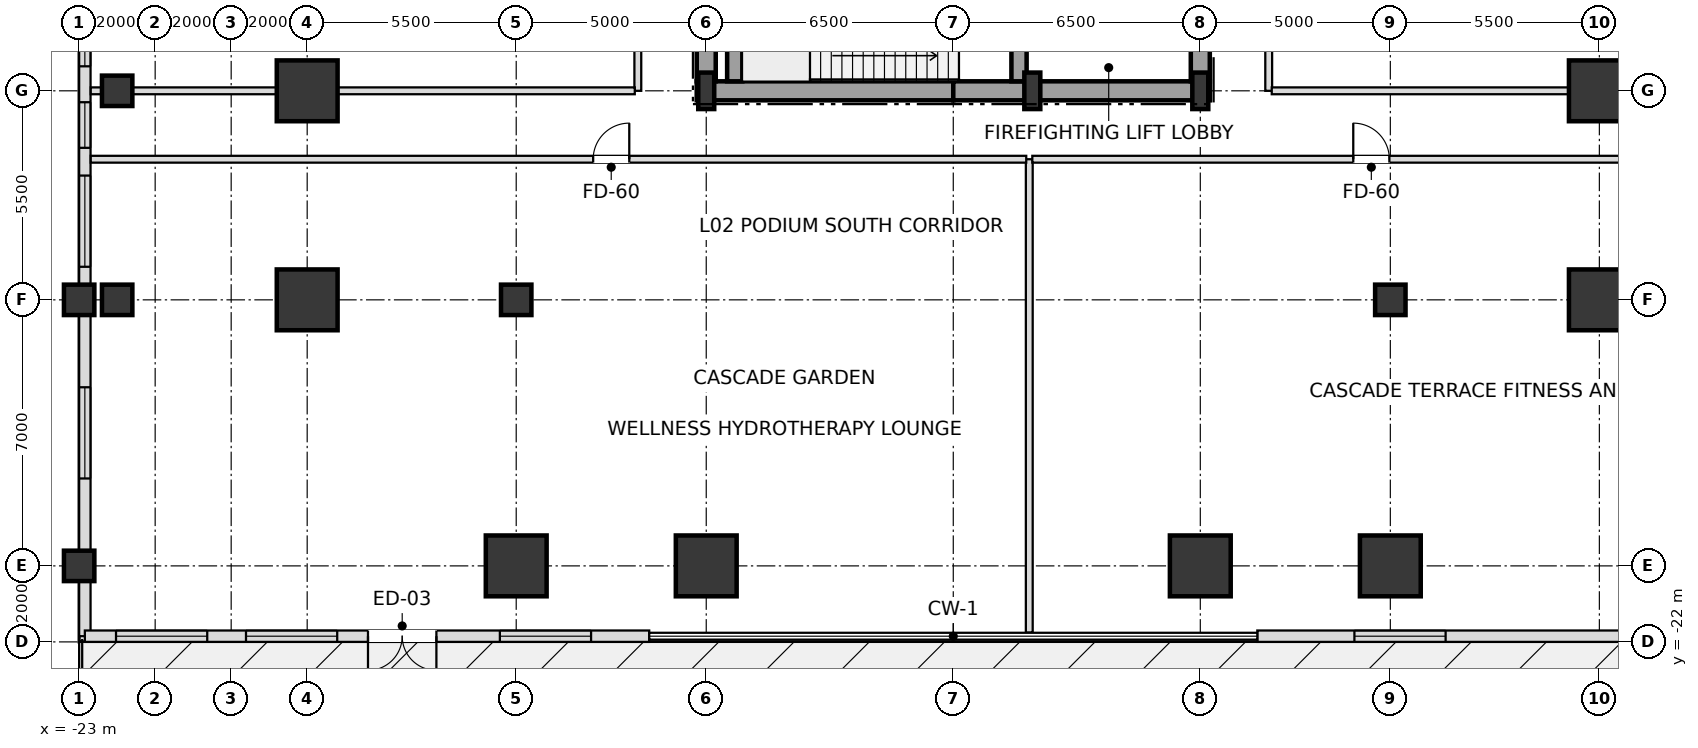
"""IFC4 building model, lengths in metres.
Left out: names, types, materials, properties, quantities, classifications, styles, units other than length and angle.
Written with IfcOpenShell. Run it as: python <this file> out.ifc"""

import sys

from ifc_helpers import new_model, si_unit, direction, frame, frame_2d, origin, origin_2d, place, context, subcontext, project, spatial, rectangle, i_section, extrude, element, fill, save


model = new_model("IFC4")
c1 = context("Model", 3, precision=1e-05, world=origin(), true_north=direction((0.0, 1.0)))
c2 = subcontext(c1, "Body", "Model", "MODEL_VIEW")
j1 = project(units=[si_unit("LENGTHUNIT", "METRE"), si_unit("PLANEANGLEUNIT", "RADIAN")], contexts=[c1])
p1 = place(None, origin())
s1 = spatial("IfcSite", under=j1, at=p1, CompositionType="ELEMENT")
p2 = place(p1, origin())
s2 = spatial("IfcBuilding", under=s1, at=p2, CompositionType="ELEMENT")
p3 = place(p2, frame((0.0, 0.0, 11.4)))
s3 = spatial("IfcBuildingStorey", under=s2, at=p3, CompositionType="ELEMENT", Elevation=11.4)
for number, where, z_axis, x_axis in (
    (1, (-6.5, -7.5, 0.0), (0.0, 0.0, 1.0), (1.0, 0.0, 0.0)),
    (2, (2.08, -7.5, 0.0), (0.0, 0.0, 1.0), (1.0, 0.0, 0.0)),
    (3, (6.5, -7.5, 0.0), (0.0, 0.0, 1.0), (1.0, 0.0, 0.0)),
):
    element("IfcColumn", number, at=place(p3, frame(where, z_axis=z_axis, x_axis=x_axis)), inside=s3, PredefinedType="COLUMN", context=c2, shape_type="SweptSolid", body=[
        extrude(i_section(OverallWidth=0.42, OverallDepth=0.96, WebThickness=0.022, FlangeThickness=0.034, at=origin_2d()), origin(), (0.0, 0.0, 1.0), 5.4),
    ])
for number, where, z_axis, x_axis in (
    (4, (-11.5, -20.0, 0.0), (0.0, 0.0, 1.0), (1.0, 0.0, 0.0)),
    (5, (-6.5, -20.0, 0.0), (0.0, 0.0, 1.0), (1.0, 0.0, 0.0)),
    (6, (6.5, -20.0, 0.0), (0.0, 0.0, 1.0), (1.0, 0.0, 0.0)),
    (7, (11.5, -20.0, 0.0), (0.0, 0.0, 1.0), (1.0, 0.0, 0.0)),
    (8, (17.0, -13.0, 0.0), (0.0, 0.0, 1.0), (1.0, 0.0, 0.0)),
    (9, (17.0, -7.5, 0.0), (0.0, 0.0, 1.0), (1.0, 0.0, 0.0)),
    (10, (-17.0, -7.5, 0.0), (0.0, 0.0, 1.0), (1.0, 0.0, 0.0)),
    (11, (-17.0, -13.0, 0.0), (0.0, 0.0, 1.0), (1.0, 0.0, 0.0)),
):
    element("IfcColumn", number, at=place(p3, frame(where, z_axis=z_axis, x_axis=x_axis)), inside=s3, PredefinedType="USERDEFINED", context=c2, shape_type="SweptSolid", body=[
        extrude(rectangle(XDim=1.6, YDim=1.6, at=origin_2d()), origin(), (0.0, 0.0, 1.0), 5.4),
    ])
for number, where, z_axis, x_axis in (
    (12, (-23.0, -20.0, 0.0), (0.0, 0.0, 1.0), (1.0, 0.0, 0.0)),
    (13, (-23.0, -13.0, 0.0), (0.0, 0.0, 1.0), (1.0, 0.0, 0.0)),
    (14, (-11.5, -13.0, 0.0), (0.0, 0.0, 1.0), (1.0, 0.0, 0.0)),
    (15, (11.5, -13.0, 0.0), (0.0, 0.0, 1.0), (1.0, 0.0, 0.0)),
    (16, (-22.0, -13.0, 0.0), (0.0, 0.0, 1.0), (1.0, 0.0, 0.0)),
    (17, (-22.0, -7.5, 0.0), (0.0, 0.0, 1.0), (1.0, 0.0, 0.0)),
):
    element("IfcColumn", number, at=place(p3, frame(where, z_axis=z_axis, x_axis=x_axis)), inside=s3, PredefinedType="COLUMN", context=c2, shape_type="SweptSolid", body=[
        extrude(rectangle(XDim=0.8, YDim=0.8, at=origin_2d()), origin(), (0.0, 0.0, 1.0), 5.4),
    ])
p4 = place(p3, frame((-22.85, 21.85, 0.0), z_axis=(0.0, 0.0, 1.0), x_axis=(0.0, -1.0, 0.0)))
e18 = element("IfcWall", 18, at=p4, inside=s3, PredefinedType="SOLIDWALL", context=c2, shape_type="SweptSolid", body=[
    extrude(rectangle(XDim=43.7, YDim=0.3, at=frame_2d((21.85, 0.0))), origin(), (0.0, 0.0, 1.0), 4.476),
])
p5 = place(p4, frame((3.02, 0.0, 0.8)))
e19 = element("IfcOpeningElement", 19, at=p5, cuts=e18, PredefinedType="OPENING", context=c2, shape_type="SweptSolid", body=[
    extrude(rectangle(XDim=2.4, YDim=2.2, at=frame_2d((1.2, 1.1))), frame((0.0, 0.16, 0.0), z_axis=(0.0, -1.0, 0.0), x_axis=(1.0, 0.0, 0.0)), (0.0, 0.0, 1.0), 0.32),
])
p6 = place(p4, frame((6.68, 0.0, 0.72)))
e20 = element("IfcOpeningElement", 20, at=p6, cuts=e18, PredefinedType="OPENING", context=c2, shape_type="SweptSolid", body=[
    extrude(rectangle(XDim=1.2, YDim=1.68, at=frame_2d((0.6, 0.84))), frame((0.0, 0.16, 0.0), z_axis=(0.0, -1.0, 0.0), x_axis=(1.0, 0.0, 0.0)), (0.0, 0.0, 1.0), 0.32),
])
p7 = place(p4, frame((9.72, 0.0, 0.8)))
e21 = element("IfcOpeningElement", 21, at=p7, cuts=e18, PredefinedType="OPENING", context=c2, shape_type="SweptSolid", body=[
    extrude(rectangle(XDim=2.4, YDim=2.2, at=frame_2d((1.2, 1.1))), frame((0.0, 0.16, 0.0), z_axis=(0.0, -1.0, 0.0), x_axis=(1.0, 0.0, 0.0)), (0.0, 0.0, 1.0), 0.32),
])
p8 = place(p4, frame((12.85, 0.0, 0.72)))
e22 = element("IfcOpeningElement", 22, at=p8, cuts=e18, PredefinedType="OPENING", context=c2, shape_type="SweptSolid", body=[
    extrude(rectangle(XDim=1.2, YDim=1.68, at=frame_2d((0.6, 0.84))), frame((0.0, 0.16, 0.0), z_axis=(0.0, -1.0, 0.0), x_axis=(1.0, 0.0, 0.0)), (0.0, 0.0, 1.0), 0.32),
])
p9 = place(p4, frame((14.995, 0.0, 0.8)))
e23 = element("IfcOpeningElement", 23, at=p9, cuts=e18, PredefinedType="OPENING", context=c2, shape_type="SweptSolid", body=[
    extrude(rectangle(XDim=2.4, YDim=2.2, at=frame_2d((1.2, 1.1))), frame((0.0, 0.16, 0.0), z_axis=(0.0, -1.0, 0.0), x_axis=(1.0, 0.0, 0.0)), (0.0, 0.0, 1.0), 0.32),
])
p10 = place(p4, frame((18.365, 0.0, 0.8)))
e24 = element("IfcOpeningElement", 24, at=p10, cuts=e18, PredefinedType="OPENING", context=c2, shape_type="SweptSolid", body=[
    extrude(rectangle(XDim=2.4, YDim=2.2, at=frame_2d((1.2, 1.1))), frame((0.0, 0.16, 0.0), z_axis=(0.0, -1.0, 0.0), x_axis=(1.0, 0.0, 0.0)), (0.0, 0.0, 1.0), 0.32),
])
p11 = place(p4, frame((22.935, 0.0, 0.8)))
e25 = element("IfcOpeningElement", 25, at=p11, cuts=e18, PredefinedType="OPENING", context=c2, shape_type="SweptSolid", body=[
    extrude(rectangle(XDim=2.4, YDim=2.2, at=frame_2d((1.2, 1.1))), frame((0.0, 0.16, 0.0), z_axis=(0.0, -1.0, 0.0), x_axis=(1.0, 0.0, 0.0)), (0.0, 0.0, 1.0), 0.32),
])
p12 = place(p4, frame((26.305, 0.0, 0.8)))
e26 = element("IfcOpeningElement", 26, at=p12, cuts=e18, PredefinedType="OPENING", context=c2, shape_type="SweptSolid", body=[
    extrude(rectangle(XDim=2.4, YDim=2.2, at=frame_2d((1.2, 1.1))), frame((0.0, 0.16, 0.0), z_axis=(0.0, -1.0, 0.0), x_axis=(1.0, 0.0, 0.0)), (0.0, 0.0, 1.0), 0.32),
])
p13 = place(p4, frame((29.65, 0.0, 0.72)))
e27 = element("IfcOpeningElement", 27, at=p13, cuts=e18, PredefinedType="OPENING", context=c2, shape_type="SweptSolid", body=[
    extrude(rectangle(XDim=1.2, YDim=1.68, at=frame_2d((0.6, 0.84))), frame((0.0, 0.16, 0.0), z_axis=(0.0, -1.0, 0.0), x_axis=(1.0, 0.0, 0.0)), (0.0, 0.0, 1.0), 0.32),
])
p14 = place(p4, frame((31.58, 0.0, 0.8)))
e28 = element("IfcOpeningElement", 28, at=p14, cuts=e18, PredefinedType="OPENING", context=c2, shape_type="SweptSolid", body=[
    extrude(rectangle(XDim=2.4, YDim=2.2, at=frame_2d((1.2, 1.1))), frame((0.0, 0.16, 0.0), z_axis=(0.0, -1.0, 0.0), x_axis=(1.0, 0.0, 0.0)), (0.0, 0.0, 1.0), 0.32),
])
p15 = place(p4, frame((37.15, 0.0, 0.8)))
e29 = element("IfcOpeningElement", 29, at=p15, cuts=e18, PredefinedType="OPENING", context=c2, shape_type="SweptSolid", body=[
    extrude(rectangle(XDim=2.4, YDim=2.2, at=frame_2d((1.2, 1.1))), frame((0.0, 0.16, 0.0), z_axis=(0.0, -1.0, 0.0), x_axis=(1.0, 0.0, 0.0)), (0.0, 0.0, 1.0), 0.32),
])
p16 = place(p3, frame((-8.0, -21.85, 0.0), z_axis=(0.0, 0.0, 1.0), x_axis=(-1.0, 0.0, 0.0)))
e30 = element("IfcWall", 30, at=p16, inside=s3, PredefinedType="SOLIDWALL", context=c2, shape_type="SweptSolid", body=[
    extrude(rectangle(XDim=14.85, YDim=0.3, at=frame_2d((7.425, 0.0))), origin(), (0.0, 0.0, 1.0), 5.12),
])
p17 = place(p16, frame((5.6, 0.0, 0.0)))
e31 = element("IfcOpeningElement", 31, at=p17, cuts=e30, PredefinedType="OPENING", context=c2, shape_type="SweptSolid", body=[
    extrude(rectangle(XDim=1.8, YDim=2.3, at=frame_2d((0.9, 1.15))), frame((0.0, 0.16, 0.0), z_axis=(0.0, -1.0, 0.0), x_axis=(1.0, 0.0, 0.0)), (0.0, 0.0, 1.0), 0.32),
])
p18 = place(p16, frame((1.53, 0.0, 0.8)))
e32 = element("IfcOpeningElement", 32, at=p18, cuts=e30, PredefinedType="OPENING", context=c2, shape_type="SweptSolid", body=[
    extrude(rectangle(XDim=2.4, YDim=2.2, at=frame_2d((1.2, 1.1))), frame((0.0, 0.16, 0.0), z_axis=(0.0, -1.0, 0.0), x_axis=(1.0, 0.0, 0.0)), (0.0, 0.0, 1.0), 0.32),
])
p19 = place(p16, frame((8.21, 0.0, 0.8)))
e33 = element("IfcOpeningElement", 33, at=p19, cuts=e30, PredefinedType="OPENING", context=c2, shape_type="SweptSolid", body=[
    extrude(rectangle(XDim=2.4, YDim=2.2, at=frame_2d((1.2, 1.1))), frame((0.0, 0.16, 0.0), z_axis=(0.0, -1.0, 0.0), x_axis=(1.0, 0.0, 0.0)), (0.0, 0.0, 1.0), 0.32),
])
p20 = place(p16, frame((11.63, 0.0, 0.8)))
e34 = element("IfcOpeningElement", 34, at=p20, cuts=e30, PredefinedType="OPENING", context=c2, shape_type="SweptSolid", body=[
    extrude(rectangle(XDim=2.4, YDim=2.2, at=frame_2d((1.2, 1.1))), frame((0.0, 0.16, 0.0), z_axis=(0.0, -1.0, 0.0), x_axis=(1.0, 0.0, 0.0)), (0.0, 0.0, 1.0), 0.32),
])
p21 = place(p3, frame((22.85, -21.85, 0.0), z_axis=(0.0, 0.0, 1.0), x_axis=(-1.0, 0.0, 0.0)))
e35 = element("IfcWall", 35, at=p21, inside=s3, PredefinedType="SOLIDWALL", context=c2, shape_type="SweptSolid", body=[
    extrude(rectangle(XDim=14.85, YDim=0.3, at=frame_2d((7.425, 0.0))), origin(), (0.0, 0.0, 1.0), 5.12),
])
p22 = place(p21, frame((2.705, 0.0, 0.8)))
e36 = element("IfcOpeningElement", 36, at=p22, cuts=e35, PredefinedType="OPENING", context=c2, shape_type="SweptSolid", body=[
    extrude(rectangle(XDim=2.4, YDim=2.2, at=frame_2d((1.2, 1.1))), frame((0.0, 0.16, 0.0), z_axis=(0.0, -1.0, 0.0), x_axis=(1.0, 0.0, 0.0)), (0.0, 0.0, 1.0), 0.32),
])
p23 = place(p21, frame((9.895, 0.0, 0.8)))
e37 = element("IfcOpeningElement", 37, at=p23, cuts=e35, PredefinedType="OPENING", context=c2, shape_type="SweptSolid", body=[
    extrude(rectangle(XDim=2.4, YDim=2.2, at=frame_2d((1.2, 1.1))), frame((0.0, 0.16, 0.0), z_axis=(0.0, -1.0, 0.0), x_axis=(1.0, 0.0, 0.0)), (0.0, 0.0, 1.0), 0.32),
])
for number, where, z_axis, x_axis in (
    (38, (-6.75, -7.5, 0.0), (0.0, 0.0, 1.0), (1.0, 0.0, 0.0)),
    (39, (0.0, -7.5, 0.0), (0.0, 0.0, 1.0), (1.0, 0.0, 0.0)),
):
    element("IfcWall", number, at=place(p3, frame(where, z_axis=z_axis, x_axis=x_axis)), inside=s3, PredefinedType="SHEAR", context=c2, shape_type="SweptSolid", body=[
        extrude(rectangle(XDim=6.75, YDim=0.5, at=frame_2d((3.375, 0.0))), origin(), (0.0, 0.0, 1.0), 5.12),
    ])
p24 = place(p3, frame((-6.5, -7.25, 0.0), z_axis=(0.0, 0.0, 1.0), x_axis=(0.0, 1.0, 0.0)))
e40 = element("IfcWall", 40, at=p24, inside=s3, PredefinedType="SHEAR", context=c2, shape_type="SweptSolid", body=[
    extrude(rectangle(XDim=3.55, YDim=0.5, at=frame_2d((1.775, 0.0))), origin(), (0.0, 0.0, 1.0), 5.12),
])
p25 = place(p3, frame((6.5, -7.25, 0.0), z_axis=(0.0, 0.0, 1.0), x_axis=(0.0, 1.0, 0.0)))
e41 = element("IfcWall", 41, at=p25, inside=s3, PredefinedType="SHEAR", context=c2, shape_type="SweptSolid", body=[
    extrude(rectangle(XDim=5.75, YDim=0.5, at=frame_2d((2.875, 0.0))), origin(), (0.0, 0.0, 1.0), 5.12),
])
p26 = place(p25, frame((0.85, 0.0, 0.0)))
e42 = element("IfcOpeningElement", 42, at=p26, cuts=e41, PredefinedType="OPENING", context=c2, shape_type="SweptSolid", body=[
    extrude(rectangle(XDim=1.05, YDim=2.15, at=frame_2d((0.525, 1.075))), frame((0.0, 0.26, 0.0), z_axis=(0.0, -1.0, 0.0), x_axis=(1.0, 0.0, 0.0)), (0.0, 0.0, 1.0), 0.52),
])
p27 = place(p3, frame((-5.75, -7.25, 0.0), z_axis=(0.0, 0.0, 1.0), x_axis=(0.0, 1.0, 0.0)))
e43 = element("IfcWall", 43, at=p27, inside=s3, PredefinedType="SHEAR", context=c2, shape_type="SweptSolid", body=[
    extrude(rectangle(XDim=2.9, YDim=0.4, at=frame_2d((1.45, 0.0))), origin(), (0.0, 0.0, 1.0), 5.12),
])
p28 = place(p3, frame((1.73, -7.25, 0.0), z_axis=(0.0, 0.0, 1.0), x_axis=(0.0, 1.0, 0.0)))
e44 = element("IfcWall", 44, at=p28, inside=s3, PredefinedType="SHEAR", context=c2, shape_type="SweptSolid", body=[
    extrude(rectangle(XDim=3.3, YDim=0.4, at=frame_2d((1.65, 0.0))), origin(), (0.0, 0.0, 1.0), 5.12),
])
p29 = place(p28, frame((0.9, 0.0, 0.0)))
e45 = element("IfcOpeningElement", 45, at=p29, cuts=e44, PredefinedType="OPENING", context=c2, shape_type="SweptSolid", body=[
    extrude(rectangle(XDim=1.05, YDim=2.15, at=frame_2d((0.525, 1.075))), frame((0.0, 0.21, 0.0), z_axis=(0.0, -1.0, 0.0), x_axis=(1.0, 0.0, 0.0)), (0.0, 0.0, 1.0), 0.42),
])
p30 = place(p3, frame((-8.3, -7.5, 0.0), z_axis=(0.0, 0.0, 1.0), x_axis=(0.0, 1.0, 0.0)))
e46 = element("IfcWall", 46, at=p30, inside=s3, PredefinedType="PARTITIONING", context=c2, shape_type="SweptSolid", body=[
    extrude(rectangle(XDim=15.0, YDim=0.18, at=frame_2d((7.5, 0.0))), origin(), (0.0, 0.0, 1.0), 5.12),
])
p31 = place(p30, frame((7.025, 0.0, 0.0)))
e47 = element("IfcOpeningElement", 47, at=p31, cuts=e46, PredefinedType="OPENING", context=c2, shape_type="SweptSolid", body=[
    extrude(rectangle(XDim=0.95, YDim=2.15, at=frame_2d((0.475, 1.075))), frame((0.0, 0.1, 0.0), z_axis=(0.0, -1.0, 0.0), x_axis=(1.0, 0.0, 0.0)), (0.0, 0.0, 1.0), 0.2),
])
p32 = place(p3, frame((2.0, -21.755, 0.0), z_axis=(0.0, 0.0, 1.0), x_axis=(0.0, 1.0, 0.0)))
e48 = element("IfcWall", 48, at=p32, inside=s3, PredefinedType="PARTITIONING", context=c2, shape_type="SweptSolid", body=[
    extrude(rectangle(XDim=12.455, YDim=0.18, at=frame_2d((6.228, 0.0))), origin(), (0.0, 0.0, 1.0), 4.476),
])
p33 = place(p3, frame((8.3, -7.5, 0.0), z_axis=(0.0, 0.0, 1.0), x_axis=(0.0, 1.0, 0.0)))
e49 = element("IfcWall", 49, at=p33, inside=s3, PredefinedType="PARTITIONING", context=c2, shape_type="SweptSolid", body=[
    extrude(rectangle(XDim=15.0, YDim=0.18, at=frame_2d((7.5, 0.0))), origin(), (0.0, 0.0, 1.0), 5.12),
])
p34 = place(p33, frame((5.025, 0.0, 0.0)))
e50 = element("IfcOpeningElement", 50, at=p34, cuts=e49, PredefinedType="OPENING", context=c2, shape_type="SweptSolid", body=[
    extrude(rectangle(XDim=0.95, YDim=2.15, at=frame_2d((0.475, 1.075))), frame((0.0, 0.1, 0.0), z_axis=(0.0, -1.0, 0.0), x_axis=(1.0, 0.0, 0.0)), (0.0, 0.0, 1.0), 0.2),
])
p35 = place(p33, frame((12.225, 0.0, 0.0)))
e51 = element("IfcOpeningElement", 51, at=p35, cuts=e49, PredefinedType="OPENING", context=c2, shape_type="SweptSolid", body=[
    extrude(rectangle(XDim=0.95, YDim=2.15, at=frame_2d((0.475, 1.075))), frame((0.0, 0.1, 0.0), z_axis=(0.0, -1.0, 0.0), x_axis=(1.0, 0.0, 0.0)), (0.0, 0.0, 1.0), 0.2),
])
p36 = place(p3, frame((-22.695, -9.3, 0.0), z_axis=(0.0, 0.0, 1.0), x_axis=(1.0, 0.0, 0.0)))
e52 = element("IfcWall", 52, at=p36, inside=s3, PredefinedType="PARTITIONING", context=c2, shape_type="SweptSolid", body=[
    extrude(rectangle(XDim=24.615, YDim=0.18, at=frame_2d((12.308, 0.0))), origin(), (0.0, 0.0, 1.0), 4.41),
])
p37 = place(p36, frame((13.22, 0.0, 0.0)))
e53 = element("IfcOpeningElement", 53, at=p37, cuts=e52, PredefinedType="OPENING", context=c2, shape_type="SweptSolid", body=[
    extrude(rectangle(XDim=0.95, YDim=2.15, at=frame_2d((0.475, 1.075))), frame((0.0, 0.1, 0.0), z_axis=(0.0, -1.0, 0.0), x_axis=(1.0, 0.0, 0.0)), (0.0, 0.0, 1.0), 0.2),
])
p38 = place(p3, frame((2.08, -9.3, 0.0), z_axis=(0.0, 0.0, 1.0), x_axis=(1.0, 0.0, 0.0)))
e54 = element("IfcWall", 54, at=p38, inside=s3, PredefinedType="PARTITIONING", context=c2, shape_type="SweptSolid", body=[
    extrude(rectangle(XDim=20.655, YDim=0.18, at=frame_2d((10.328, 0.0))), origin(), (0.0, 0.0, 1.0), 4.41),
])
p39 = place(p38, frame((8.445, 0.0, 0.0)))
e55 = element("IfcOpeningElement", 55, at=p39, cuts=e54, PredefinedType="OPENING", context=c2, shape_type="SweptSolid", body=[
    extrude(rectangle(XDim=0.95, YDim=2.15, at=frame_2d((0.475, 1.075))), frame((0.0, 0.1, 0.0), z_axis=(0.0, -1.0, 0.0), x_axis=(1.0, 0.0, 0.0)), (0.0, 0.0, 1.0), 0.2),
])
p40 = place(p3, frame((-22.695, -7.5, 0.0), z_axis=(0.0, 0.0, 1.0), x_axis=(1.0, 0.0, 0.0)))
e56 = element("IfcWall", 56, at=p40, inside=s3, PredefinedType="PARTITIONING", context=c2, shape_type="SweptSolid", body=[
    extrude(rectangle(XDim=14.315, YDim=0.18, at=frame_2d((7.158, 0.0))), origin(), (0.0, 0.0, 1.0), 4.41),
])
p41 = place(p3, frame((8.38, -7.5, 0.0), z_axis=(0.0, 0.0, 1.0), x_axis=(1.0, 0.0, 0.0)))
e57 = element("IfcWall", 57, at=p41, inside=s3, PredefinedType="PARTITIONING", context=c2, shape_type="SweptSolid", body=[
    extrude(rectangle(XDim=14.355, YDim=0.18, at=frame_2d((7.178, 0.0))), origin(), (0.0, 0.0, 1.0), 4.41),
])
p42 = place(p12, origin())
e58 = element("IfcWindow", 58, at=p42, inside=s3, PartitioningType="SINGLE_PANEL", PredefinedType="WINDOW", context=c2, shape_type="SweptSolid", body=[
    extrude(rectangle(XDim=2.4, YDim=2.2, at=frame_2d((1.2, 1.1))), frame((0.0, 0.03, 0.0), z_axis=(0.0, -1.0, 0.0), x_axis=(1.0, 0.0, 0.0)), (0.0, 0.0, 1.0), 0.06),
])
fill(e26, e58)
p43 = place(p13, origin())
e59 = element("IfcWindow", 59, at=p43, inside=s3, PartitioningType="SINGLE_PANEL", PredefinedType="WINDOW", context=c2, shape_type="SweptSolid", body=[
    extrude(rectangle(XDim=1.2, YDim=1.68, at=frame_2d((0.6, 0.84))), frame((0.0, 0.03, 0.0), z_axis=(0.0, -1.0, 0.0), x_axis=(1.0, 0.0, 0.0)), (0.0, 0.0, 1.0), 0.06),
])
fill(e27, e59)
p44 = place(p14, origin())
e60 = element("IfcWindow", 60, at=p44, inside=s3, PartitioningType="SINGLE_PANEL", PredefinedType="WINDOW", context=c2, shape_type="SweptSolid", body=[
    extrude(rectangle(XDim=2.4, YDim=2.2, at=frame_2d((1.2, 1.1))), frame((0.0, 0.03, 0.0), z_axis=(0.0, -1.0, 0.0), x_axis=(1.0, 0.0, 0.0)), (0.0, 0.0, 1.0), 0.06),
])
fill(e28, e60)
p45 = place(p15, origin())
e61 = element("IfcWindow", 61, at=p45, inside=s3, PartitioningType="SINGLE_PANEL", PredefinedType="WINDOW", context=c2, shape_type="SweptSolid", body=[
    extrude(rectangle(XDim=2.4, YDim=2.2, at=frame_2d((1.2, 1.1))), frame((0.0, 0.03, 0.0), z_axis=(0.0, -1.0, 0.0), x_axis=(1.0, 0.0, 0.0)), (0.0, 0.0, 1.0), 0.06),
])
fill(e29, e61)
p46 = place(p17, origin())
e62 = element("IfcDoor", 62, at=p46, inside=s3, OperationType="DOUBLE_DOOR_SINGLE_SWING", PredefinedType="DOOR", context=c2, shape_type="SweptSolid", body=[
    extrude(rectangle(XDim=1.8, YDim=2.3, at=frame_2d((0.9, 1.15))), frame((0.0, 0.025, 0.0), z_axis=(0.0, -1.0, 0.0), x_axis=(1.0, 0.0, 0.0)), (0.0, 0.0, 1.0), 0.05),
])
fill(e31, e62)
p47 = place(p18, origin())
e63 = element("IfcWindow", 63, at=p47, inside=s3, PartitioningType="SINGLE_PANEL", PredefinedType="WINDOW", context=c2, shape_type="SweptSolid", body=[
    extrude(rectangle(XDim=2.4, YDim=2.2, at=frame_2d((1.2, 1.1))), frame((0.0, 0.03, 0.0), z_axis=(0.0, -1.0, 0.0), x_axis=(1.0, 0.0, 0.0)), (0.0, 0.0, 1.0), 0.06),
])
fill(e32, e63)
p48 = place(p19, origin())
e64 = element("IfcWindow", 64, at=p48, inside=s3, PartitioningType="SINGLE_PANEL", PredefinedType="WINDOW", context=c2, shape_type="SweptSolid", body=[
    extrude(rectangle(XDim=2.4, YDim=2.2, at=frame_2d((1.2, 1.1))), frame((0.0, 0.03, 0.0), z_axis=(0.0, -1.0, 0.0), x_axis=(1.0, 0.0, 0.0)), (0.0, 0.0, 1.0), 0.06),
])
fill(e33, e64)
p49 = place(p20, origin())
e65 = element("IfcWindow", 65, at=p49, inside=s3, PartitioningType="SINGLE_PANEL", PredefinedType="WINDOW", context=c2, shape_type="SweptSolid", body=[
    extrude(rectangle(XDim=2.4, YDim=2.2, at=frame_2d((1.2, 1.1))), frame((0.0, 0.03, 0.0), z_axis=(0.0, -1.0, 0.0), x_axis=(1.0, 0.0, 0.0)), (0.0, 0.0, 1.0), 0.06),
])
fill(e34, e65)
p50 = place(p23, origin())
e66 = element("IfcWindow", 66, at=p50, inside=s3, PartitioningType="SINGLE_PANEL", PredefinedType="WINDOW", context=c2, shape_type="SweptSolid", body=[
    extrude(rectangle(XDim=2.4, YDim=2.2, at=frame_2d((1.2, 1.1))), frame((0.0, 0.03, 0.0), z_axis=(0.0, -1.0, 0.0), x_axis=(1.0, 0.0, 0.0)), (0.0, 0.0, 1.0), 0.06),
])
fill(e37, e66)
p51 = place(p37, origin())
e67 = element("IfcDoor", 67, at=p51, inside=s3, OperationType="SINGLE_SWING_RIGHT", PredefinedType="DOOR", context=c2, shape_type="SweptSolid", body=[
    extrude(rectangle(XDim=0.95, YDim=2.15, at=frame_2d((0.475, 1.075))), frame((0.0, 0.025, 0.0), z_axis=(0.0, -1.0, 0.0), x_axis=(1.0, 0.0, 0.0)), (0.0, 0.0, 1.0), 0.05),
])
fill(e53, e67)
p52 = place(p39, origin())
e68 = element("IfcDoor", 68, at=p52, inside=s3, OperationType="SINGLE_SWING_LEFT", PredefinedType="DOOR", context=c2, shape_type="SweptSolid", body=[
    extrude(rectangle(XDim=0.95, YDim=2.15, at=frame_2d((0.475, 1.075))), frame((0.0, 0.025, 0.0), z_axis=(0.0, -1.0, 0.0), x_axis=(1.0, 0.0, 0.0)), (0.0, 0.0, 1.0), 0.05),
])
fill(e55, e68)
save(model, sys.argv[1])
